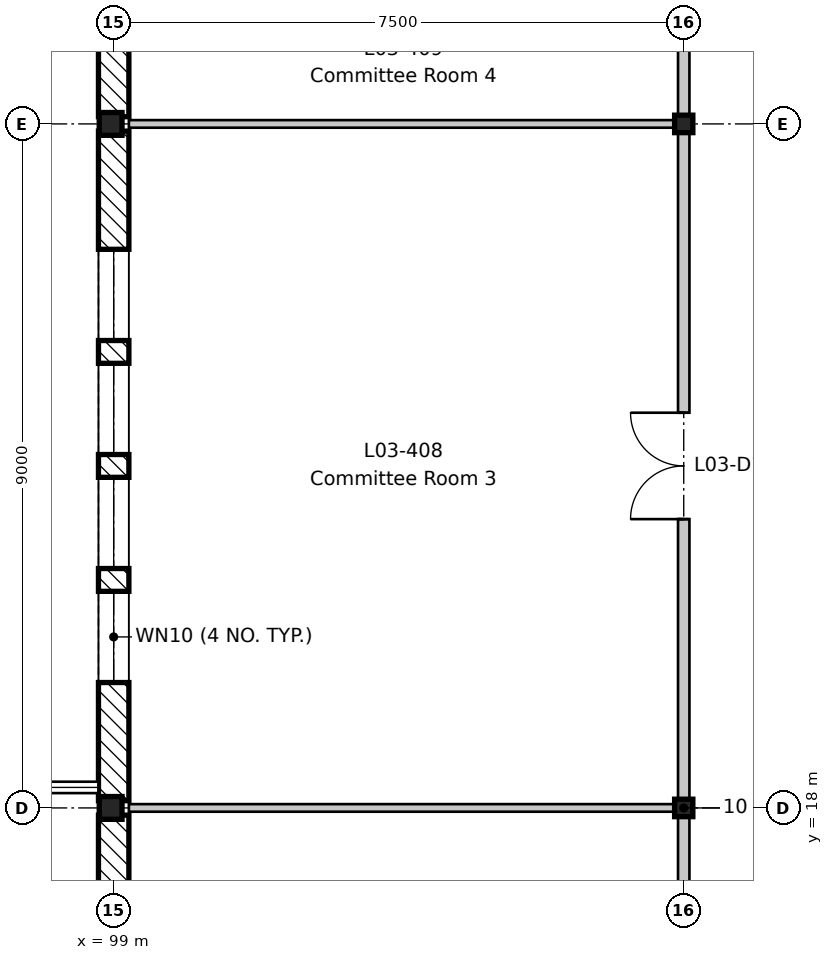
"""IFC4 building model, lengths in metres.
Left out: names, types, materials, properties, quantities, classifications, styles, units other than length and angle.
Written with IfcOpenShell. Run it as: python <this file> out.ifc"""

import sys

from ifc_helpers import new_model, si_unit, direction, frame, frame_2d, origin, origin_2d, place, context, subcontext, project, spatial, rectangle, i_section, extrude, element, fill, save


model = new_model("IFC4")
c1 = context("Model", 3, precision=1e-05, world=origin(), true_north=direction((0.0, 1.0)))
c2 = subcontext(c1, "Body", "Model", "MODEL_VIEW")
j1 = project(units=[si_unit("LENGTHUNIT", "METRE"), si_unit("PLANEANGLEUNIT", "RADIAN")], contexts=[c1])
p1 = place(None, origin())
s1 = spatial("IfcSite", under=j1, at=p1, CompositionType="ELEMENT")
p2 = place(p1, origin())
s2 = spatial("IfcBuilding", under=s1, at=p2, CompositionType="ELEMENT")
p3 = place(p2, frame((0.0, 0.0, 14.4)))
s3 = spatial("IfcBuildingStorey", under=s2, at=p3, CompositionType="ELEMENT", Elevation=14.4)
for number, where, z_axis, x_axis in (
    (1, (99.0, 18.0, -0.2), (0.0, 0.0, 1.0), (1.0, 0.0, 0.0)),
    (2, (99.0, 27.0, -0.2), (0.0, 0.0, 1.0), (1.0, 0.0, 0.0)),
):
    element("IfcColumn", number, at=place(p3, frame(where, z_axis=z_axis, x_axis=x_axis)), inside=s3, PredefinedType="COLUMN", context=c2, shape_type="SweptSolid", body=[
        extrude(i_section(OverallWidth=0.2, OverallDepth=0.19, WebThickness=0.007, FlangeThickness=0.01, FilletRadius=0.018, at=origin_2d()), origin(), (0.0, 0.0, 1.0), 4.15),
    ])
for number, where, z_axis, x_axis in (
    (3, (106.5, 18.0, -0.2), (0.0, 0.0, 1.0), (1.0, 0.0, 0.0)),
    (4, (106.5, 27.0, -0.2), (0.0, 0.0, 1.0), (1.0, 0.0, 0.0)),
):
    element("IfcColumn", number, at=place(p3, frame(where, z_axis=z_axis, x_axis=x_axis)), inside=s3, PredefinedType="COLUMN", context=c2, shape_type="SweptSolid", body=[
        extrude(i_section(OverallWidth=0.24, OverallDepth=0.23, WebThickness=0.008, FlangeThickness=0.012, FilletRadius=0.021, at=origin_2d()), origin(), (0.0, 0.0, 1.0), 4.15),
    ])
for number, where, z_axis, x_axis in (
    (5, (98.96, 18.0, 3.95), (0.0, 0.0, 1.0), (1.0, 0.0, 0.0)),
    (6, (98.96, 27.0, 3.95), (0.0, 0.0, 1.0), (1.0, 0.0, 0.0)),
):
    element("IfcColumn", number, at=place(p3, frame(where, z_axis=z_axis, x_axis=x_axis)), inside=s3, PredefinedType="COLUMN", context=c2, shape_type="SweptSolid", body=[
        extrude(i_section(OverallWidth=0.3, OverallDepth=0.3, WebThickness=0.011, FlangeThickness=0.019, FilletRadius=0.027, at=origin_2d()), origin(), (0.0, 0.0, 1.0), 0.25),
    ])
p4 = place(p3, frame((99.0, 9.095, 0.0), z_axis=(0.0, 0.0, 1.0), x_axis=(0.0, 1.0, 0.0)))
e7 = element("IfcWall", 7, at=p4, inside=s3, PredefinedType="STANDARD", context=c2, shape_type="SweptSolid", body=[
    extrude(rectangle(XDim=8.81, YDim=0.4, at=frame_2d((4.405, 0.0))), origin(), (0.0, 0.0, 1.0), 3.55),
])
p5 = place(p4, frame((1.555, 0.0, 0.6)))
e8 = element("IfcOpeningElement", 8, at=p5, cuts=e7, PredefinedType="OPENING", context=c2, shape_type="SweptSolid", body=[
    extrude(rectangle(XDim=1.2, YDim=1.8, at=frame_2d((0.6, 0.9))), frame((0.0, 0.21, 0.0), z_axis=(0.0, -1.0, 0.0), x_axis=(1.0, 0.0, 0.0)), (0.0, 0.0, 1.0), 0.42),
])
p6 = place(p4, frame((3.055, 0.0, 0.6)))
e9 = element("IfcOpeningElement", 9, at=p6, cuts=e7, PredefinedType="OPENING", context=c2, shape_type="SweptSolid", body=[
    extrude(rectangle(XDim=1.2, YDim=1.8, at=frame_2d((0.6, 0.9))), frame((0.0, 0.21, 0.0), z_axis=(0.0, -1.0, 0.0), x_axis=(1.0, 0.0, 0.0)), (0.0, 0.0, 1.0), 0.42),
])
p7 = place(p4, frame((4.555, 0.0, 0.6)))
e10 = element("IfcOpeningElement", 10, at=p7, cuts=e7, PredefinedType="OPENING", context=c2, shape_type="SweptSolid", body=[
    extrude(rectangle(XDim=1.2, YDim=1.8, at=frame_2d((0.6, 0.9))), frame((0.0, 0.21, 0.0), z_axis=(0.0, -1.0, 0.0), x_axis=(1.0, 0.0, 0.0)), (0.0, 0.0, 1.0), 0.42),
])
p8 = place(p4, frame((6.055, 0.0, 0.6)))
e11 = element("IfcOpeningElement", 11, at=p8, cuts=e7, PredefinedType="OPENING", context=c2, shape_type="SweptSolid", body=[
    extrude(rectangle(XDim=1.2, YDim=1.8, at=frame_2d((0.6, 0.9))), frame((0.0, 0.21, 0.0), z_axis=(0.0, -1.0, 0.0), x_axis=(1.0, 0.0, 0.0)), (0.0, 0.0, 1.0), 0.42),
])
p9 = place(p3, frame((99.0, 18.095, 0.0), z_axis=(0.0, 0.0, 1.0), x_axis=(0.0, 1.0, 0.0)))
e12 = element("IfcWall", 12, at=p9, inside=s3, PredefinedType="STANDARD", context=c2, shape_type="SweptSolid", body=[
    extrude(rectangle(XDim=8.81, YDim=0.4, at=frame_2d((4.405, 0.0))), origin(), (0.0, 0.0, 1.0), 3.55),
])
p10 = place(p9, frame((1.555, 0.0, 0.6)))
e13 = element("IfcOpeningElement", 13, at=p10, cuts=e12, PredefinedType="OPENING", context=c2, shape_type="SweptSolid", body=[
    extrude(rectangle(XDim=1.2, YDim=1.8, at=frame_2d((0.6, 0.9))), frame((0.0, 0.21, 0.0), z_axis=(0.0, -1.0, 0.0), x_axis=(1.0, 0.0, 0.0)), (0.0, 0.0, 1.0), 0.42),
])
p11 = place(p9, frame((3.055, 0.0, 0.6)))
e14 = element("IfcOpeningElement", 14, at=p11, cuts=e12, PredefinedType="OPENING", context=c2, shape_type="SweptSolid", body=[
    extrude(rectangle(XDim=1.2, YDim=1.8, at=frame_2d((0.6, 0.9))), frame((0.0, 0.21, 0.0), z_axis=(0.0, -1.0, 0.0), x_axis=(1.0, 0.0, 0.0)), (0.0, 0.0, 1.0), 0.42),
])
p12 = place(p9, frame((4.555, 0.0, 0.6)))
e15 = element("IfcOpeningElement", 15, at=p12, cuts=e12, PredefinedType="OPENING", context=c2, shape_type="SweptSolid", body=[
    extrude(rectangle(XDim=1.2, YDim=1.8, at=frame_2d((0.6, 0.9))), frame((0.0, 0.21, 0.0), z_axis=(0.0, -1.0, 0.0), x_axis=(1.0, 0.0, 0.0)), (0.0, 0.0, 1.0), 0.42),
])
p13 = place(p9, frame((6.055, 0.0, 0.6)))
e16 = element("IfcOpeningElement", 16, at=p13, cuts=e12, PredefinedType="OPENING", context=c2, shape_type="SweptSolid", body=[
    extrude(rectangle(XDim=1.2, YDim=1.8, at=frame_2d((0.6, 0.9))), frame((0.0, 0.21, 0.0), z_axis=(0.0, -1.0, 0.0), x_axis=(1.0, 0.0, 0.0)), (0.0, 0.0, 1.0), 0.42),
])
p14 = place(p3, frame((99.0, 27.095, 0.0), z_axis=(0.0, 0.0, 1.0), x_axis=(0.0, 1.0, 0.0)))
e17 = element("IfcWall", 17, at=p14, inside=s3, PredefinedType="STANDARD", context=c2, shape_type="SweptSolid", body=[
    extrude(rectangle(XDim=8.81, YDim=0.4, at=frame_2d((4.405, 0.0))), origin(), (0.0, 0.0, 1.0), 3.55),
])
p15 = place(p14, frame((1.555, 0.0, 0.6)))
e18 = element("IfcOpeningElement", 18, at=p15, cuts=e17, PredefinedType="OPENING", context=c2, shape_type="SweptSolid", body=[
    extrude(rectangle(XDim=1.2, YDim=1.8, at=frame_2d((0.6, 0.9))), frame((0.0, 0.21, 0.0), z_axis=(0.0, -1.0, 0.0), x_axis=(1.0, 0.0, 0.0)), (0.0, 0.0, 1.0), 0.42),
])
p16 = place(p14, frame((3.055, 0.0, 0.6)))
e19 = element("IfcOpeningElement", 19, at=p16, cuts=e17, PredefinedType="OPENING", context=c2, shape_type="SweptSolid", body=[
    extrude(rectangle(XDim=1.2, YDim=1.8, at=frame_2d((0.6, 0.9))), frame((0.0, 0.21, 0.0), z_axis=(0.0, -1.0, 0.0), x_axis=(1.0, 0.0, 0.0)), (0.0, 0.0, 1.0), 0.42),
])
p17 = place(p14, frame((4.555, 0.0, 0.6)))
e20 = element("IfcOpeningElement", 20, at=p17, cuts=e17, PredefinedType="OPENING", context=c2, shape_type="SweptSolid", body=[
    extrude(rectangle(XDim=1.2, YDim=1.8, at=frame_2d((0.6, 0.9))), frame((0.0, 0.21, 0.0), z_axis=(0.0, -1.0, 0.0), x_axis=(1.0, 0.0, 0.0)), (0.0, 0.0, 1.0), 0.42),
])
p18 = place(p14, frame((6.055, 0.0, 0.6)))
e21 = element("IfcOpeningElement", 21, at=p18, cuts=e17, PredefinedType="OPENING", context=c2, shape_type="SweptSolid", body=[
    extrude(rectangle(XDim=1.2, YDim=1.8, at=frame_2d((0.6, 0.9))), frame((0.0, 0.21, 0.0), z_axis=(0.0, -1.0, 0.0), x_axis=(1.0, 0.0, 0.0)), (0.0, 0.0, 1.0), 0.42),
])
for number, where, z_axis, x_axis in (
    (22, (99.2, 18.0, 0.0), (0.0, 0.0, 1.0), (1.0, 0.0, 0.0)),
    (23, (99.2, 27.0, 0.0), (0.0, 0.0, 1.0), (1.0, 0.0, 0.0)),
):
    element("IfcWall", number, at=place(p3, frame(where, z_axis=z_axis, x_axis=x_axis)), inside=s3, PredefinedType="PARTITIONING", context=c2, shape_type="SweptSolid", body=[
        extrude(rectangle(XDim=7.225, YDim=0.1, at=frame_2d((3.613, 0.0))), origin(), (0.0, 0.0, 1.0), 3.6),
    ])
p19 = place(p3, frame((106.5, 0.2, 0.0), z_axis=(0.0, 0.0, 1.0), x_axis=(0.0, 1.0, 0.0)))
e24 = element("IfcWall", 24, at=p19, inside=s3, PredefinedType="PARTITIONING", context=c2, shape_type="SweptSolid", body=[
    extrude(rectangle(XDim=53.6, YDim=0.15, at=frame_2d((26.8, 0.0))), origin(), (0.0, 0.0, 1.0), 3.43),
])
p20 = place(p19, frame((3.6, 0.0, 0.0)))
e25 = element("IfcOpeningElement", 25, at=p20, cuts=e24, PredefinedType="OPENING", context=c2, shape_type="SweptSolid", body=[
    extrude(rectangle(XDim=1.4, YDim=2.1, at=frame_2d((0.7, 1.05))), frame((0.0, 0.085, 0.0), z_axis=(0.0, -1.0, 0.0), x_axis=(1.0, 0.0, 0.0)), (0.0, 0.0, 1.0), 0.17),
])
p21 = place(p19, frame((11.3, 0.0, 0.0)))
e26 = element("IfcOpeningElement", 26, at=p21, cuts=e24, PredefinedType="OPENING", context=c2, shape_type="SweptSolid", body=[
    extrude(rectangle(XDim=1.0, YDim=2.1, at=frame_2d((0.5, 1.05))), frame((0.0, 0.085, 0.0), z_axis=(0.0, -1.0, 0.0), x_axis=(1.0, 0.0, 0.0)), (0.0, 0.0, 1.0), 0.17),
])
p22 = place(p19, frame((15.8, 0.0, 0.0)))
e27 = element("IfcOpeningElement", 27, at=p22, cuts=e24, PredefinedType="OPENING", context=c2, shape_type="SweptSolid", body=[
    extrude(rectangle(XDim=1.0, YDim=2.1, at=frame_2d((0.5, 1.05))), frame((0.0, 0.085, 0.0), z_axis=(0.0, -1.0, 0.0), x_axis=(1.0, 0.0, 0.0)), (0.0, 0.0, 1.0), 0.17),
])
p23 = place(p19, frame((21.6, 0.0, 0.0)))
e28 = element("IfcOpeningElement", 28, at=p23, cuts=e24, PredefinedType="OPENING", context=c2, shape_type="SweptSolid", body=[
    extrude(rectangle(XDim=1.4, YDim=2.1, at=frame_2d((0.7, 1.05))), frame((0.0, 0.085, 0.0), z_axis=(0.0, -1.0, 0.0), x_axis=(1.0, 0.0, 0.0)), (0.0, 0.0, 1.0), 0.17),
])
p24 = place(p19, frame((29.3, 0.0, 0.0)))
e29 = element("IfcOpeningElement", 29, at=p24, cuts=e24, PredefinedType="OPENING", context=c2, shape_type="SweptSolid", body=[
    extrude(rectangle(XDim=1.0, YDim=2.1, at=frame_2d((0.5, 1.05))), frame((0.0, 0.085, 0.0), z_axis=(0.0, -1.0, 0.0), x_axis=(1.0, 0.0, 0.0)), (0.0, 0.0, 1.0), 0.17),
])
p25 = place(p19, frame((36.6, 0.0, 0.0)))
e30 = element("IfcOpeningElement", 30, at=p25, cuts=e24, PredefinedType="OPENING", context=c2, shape_type="SweptSolid", body=[
    extrude(rectangle(XDim=1.4, YDim=2.1, at=frame_2d((0.7, 1.05))), frame((0.0, 0.085, 0.0), z_axis=(0.0, -1.0, 0.0), x_axis=(1.0, 0.0, 0.0)), (0.0, 0.0, 1.0), 0.17),
])
p26 = place(p19, frame((45.55, 0.0, 0.0)))
e31 = element("IfcOpeningElement", 31, at=p26, cuts=e24, PredefinedType="OPENING", context=c2, shape_type="SweptSolid", body=[
    extrude(rectangle(XDim=1.0, YDim=2.1, at=frame_2d((0.5, 1.05))), frame((0.0, 0.085, 0.0), z_axis=(0.0, -1.0, 0.0), x_axis=(1.0, 0.0, 0.0)), (0.0, 0.0, 1.0), 0.17),
])
p27 = place(p19, frame((48.8, 0.0, 0.0)))
e32 = element("IfcOpeningElement", 32, at=p27, cuts=e24, PredefinedType="OPENING", context=c2, shape_type="SweptSolid", body=[
    extrude(rectangle(XDim=1.0, YDim=2.1, at=frame_2d((0.5, 1.05))), frame((0.0, 0.085, 0.0), z_axis=(0.0, -1.0, 0.0), x_axis=(1.0, 0.0, 0.0)), (0.0, 0.0, 1.0), 0.17),
])
p28 = place(p19, frame((51.8, 0.0, 0.0)))
e33 = element("IfcOpeningElement", 33, at=p28, cuts=e24, PredefinedType="OPENING", context=c2, shape_type="SweptSolid", body=[
    extrude(rectangle(XDim=1.0, YDim=2.1, at=frame_2d((0.5, 1.05))), frame((0.0, 0.085, 0.0), z_axis=(0.0, -1.0, 0.0), x_axis=(1.0, 0.0, 0.0)), (0.0, 0.0, 1.0), 0.17),
])
p29 = place(p10, origin())
e34 = element("IfcWindow", 34, at=p29, inside=s3, PartitioningType="SINGLE_PANEL", PredefinedType="WINDOW", context=c2, shape_type="SweptSolid", body=[
    extrude(rectangle(XDim=1.2, YDim=1.8, at=frame_2d((0.6, 0.9))), frame((0.0, 0.03, 0.0), z_axis=(0.0, -1.0, 0.0), x_axis=(1.0, 0.0, 0.0)), (0.0, 0.0, 1.0), 0.06),
])
fill(e13, e34)
p30 = place(p11, origin())
e35 = element("IfcWindow", 35, at=p30, inside=s3, PartitioningType="SINGLE_PANEL", PredefinedType="WINDOW", context=c2, shape_type="SweptSolid", body=[
    extrude(rectangle(XDim=1.2, YDim=1.8, at=frame_2d((0.6, 0.9))), frame((0.0, 0.03, 0.0), z_axis=(0.0, -1.0, 0.0), x_axis=(1.0, 0.0, 0.0)), (0.0, 0.0, 1.0), 0.06),
])
fill(e14, e35)
p31 = place(p12, origin())
e36 = element("IfcWindow", 36, at=p31, inside=s3, PartitioningType="SINGLE_PANEL", PredefinedType="WINDOW", context=c2, shape_type="SweptSolid", body=[
    extrude(rectangle(XDim=1.2, YDim=1.8, at=frame_2d((0.6, 0.9))), frame((0.0, 0.03, 0.0), z_axis=(0.0, -1.0, 0.0), x_axis=(1.0, 0.0, 0.0)), (0.0, 0.0, 1.0), 0.06),
])
fill(e15, e36)
p32 = place(p13, origin())
e37 = element("IfcWindow", 37, at=p32, inside=s3, PartitioningType="SINGLE_PANEL", PredefinedType="WINDOW", context=c2, shape_type="SweptSolid", body=[
    extrude(rectangle(XDim=1.2, YDim=1.8, at=frame_2d((0.6, 0.9))), frame((0.0, 0.03, 0.0), z_axis=(0.0, -1.0, 0.0), x_axis=(1.0, 0.0, 0.0)), (0.0, 0.0, 1.0), 0.06),
])
fill(e16, e37)
p33 = place(p23, origin())
e38 = element("IfcDoor", 38, at=p33, inside=s3, OperationType="DOUBLE_DOOR_SINGLE_SWING", PredefinedType="DOOR", context=c2, shape_type="SweptSolid", body=[
    extrude(rectangle(XDim=1.4, YDim=2.1, at=frame_2d((0.7, 1.05))), frame((0.0, 0.025, 0.0), z_axis=(0.0, -1.0, 0.0), x_axis=(1.0, 0.0, 0.0)), (0.0, 0.0, 1.0), 0.05),
])
fill(e28, e38)
save(model, sys.argv[1])
